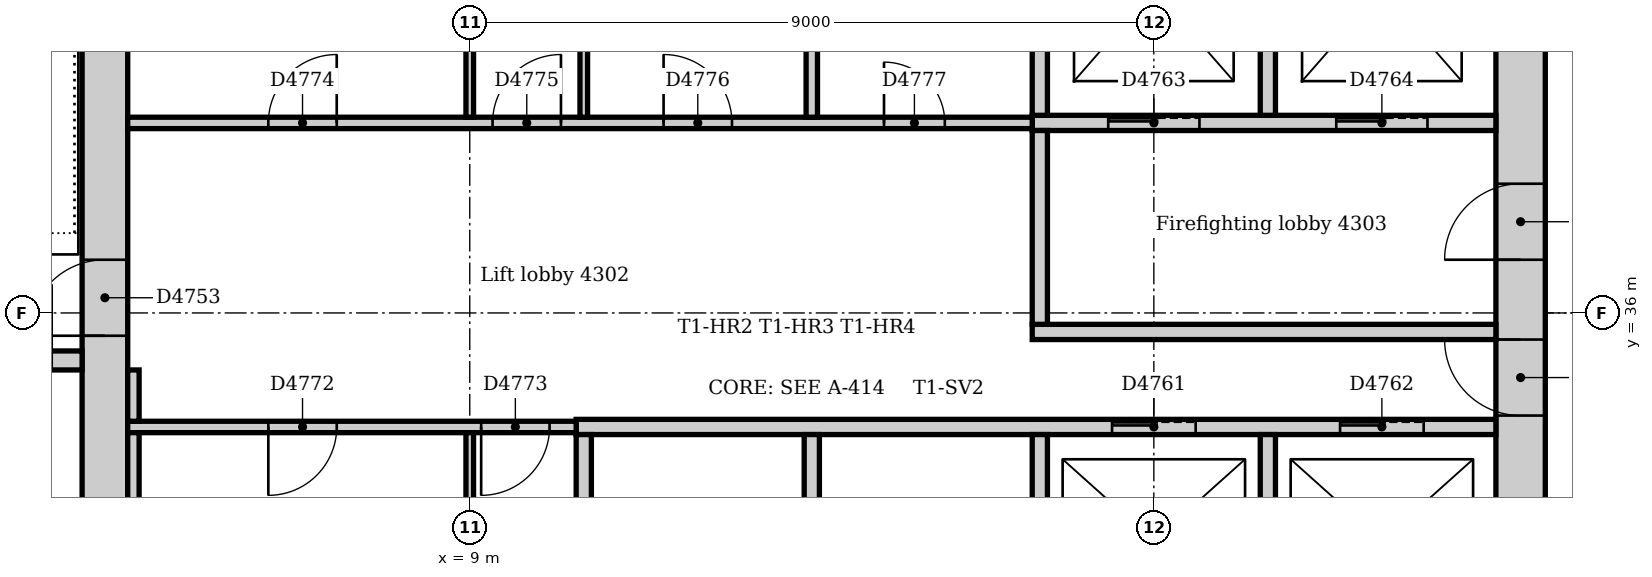
"""IFC4 building model, lengths in metres.
Left out: names, types, materials, properties, quantities, classifications, styles, units other than length and angle.
Written with IfcOpenShell. Run it as: python <this file> out.ifc"""

import sys

from ifc_helpers import new_model, si_unit, direction, frame, frame_2d, origin, place, context, subcontext, project, spatial, rectangle, extrude, element, fill, save


model = new_model("IFC4")
c1 = context("Model", 3, precision=1e-05, world=origin(), true_north=direction((0.0, 1.0)))
c2 = subcontext(c1, "Body", "Model", "MODEL_VIEW")
j1 = project(units=[si_unit("LENGTHUNIT", "METRE"), si_unit("PLANEANGLEUNIT", "RADIAN")], contexts=[c1])
p1 = place(None, origin())
s1 = spatial("IfcSite", under=j1, at=p1, CompositionType="ELEMENT")
p2 = place(p1, origin())
s2 = spatial("IfcBuilding", under=s1, at=p2, CompositionType="ELEMENT")
p3 = place(p2, frame((0.0, 0.0, 181.0)))
s3 = spatial("IfcBuildingStorey", under=s2, at=p3, CompositionType="ELEMENT", Elevation=181.0)
p4 = place(p3, frame((22.825, 31.5, 0.0), z_axis=(0.0, 0.0, 1.0), x_axis=(0.0, 1.0, 0.0)))
e1 = element("IfcWall", 1, at=p4, inside=s3, PredefinedType="SOLIDWALL", context=c2, shape_type="SweptSolid", body=[
    extrude(rectangle(XDim=10.5, YDim=0.65, at=frame_2d((5.25, 0.0))), origin(), (0.0, 0.0, 1.0), 4.0),
])
p5 = place(p4, frame((3.15, 0.0, 0.0)))
e2 = element("IfcOpeningElement", 2, at=p5, cuts=e1, PredefinedType="OPENING", context=c2, shape_type="SweptSolid", body=[
    extrude(rectangle(XDim=1.0, YDim=2.1, at=frame_2d((0.5, 1.05))), frame((0.0, 0.335, 0.0), z_axis=(0.0, -1.0, 0.0), x_axis=(1.0, 0.0, 0.0)), (0.0, 0.0, 1.0), 0.67),
])
p6 = place(p4, frame((5.2, 0.0, 0.0)))
e3 = element("IfcOpeningElement", 3, at=p6, cuts=e1, PredefinedType="OPENING", context=c2, shape_type="SweptSolid", body=[
    extrude(rectangle(XDim=1.0, YDim=2.1, at=frame_2d((0.5, 1.05))), frame((0.0, 0.335, 0.0), z_axis=(0.0, -1.0, 0.0), x_axis=(1.0, 0.0, 0.0)), (0.0, 0.0, 1.0), 0.67),
])
p7 = place(p3, frame((4.2, 42.0, 0.0), z_axis=(0.0, 0.0, 1.0), x_axis=(0.0, -1.0, 0.0)))
e4 = element("IfcWall", 4, at=p7, inside=s3, PredefinedType="SOLIDWALL", context=c2, shape_type="SweptSolid", body=[
    extrude(rectangle(XDim=10.5, YDim=0.6, at=frame_2d((5.25, 0.0))), origin(), (0.0, 0.0, 1.0), 4.0),
])
p8 = place(p7, frame((5.3, 0.0, 0.0)))
e5 = element("IfcOpeningElement", 5, at=p8, cuts=e4, PredefinedType="OPENING", context=c2, shape_type="SweptSolid", body=[
    extrude(rectangle(XDim=1.0, YDim=2.1, at=frame_2d((0.5, 1.05))), frame((0.0, 0.31, 0.0), z_axis=(0.0, -1.0, 0.0), x_axis=(1.0, 0.0, 0.0)), (0.0, 0.0, 1.0), 0.62),
])
p9 = place(p3, frame((0.36, 35.375, 0.0), z_axis=(0.0, 0.0, 1.0), x_axis=(1.0, 0.0, 0.0)))
e6 = element("IfcWall", 6, at=p9, inside=s3, PredefinedType="SOLIDWALL", context=c2, shape_type="SweptSolid", body=[
    extrude(rectangle(XDim=3.54, YDim=0.25, at=frame_2d((1.77, 0.0))), origin(), (0.0, 0.0, 1.0), 4.0),
])
p10 = place(p9, frame((2.14, 0.0, 0.0)))
e7 = element("IfcOpeningElement", 7, at=p10, cuts=e6, PredefinedType="OPENING", context=c2, shape_type="SweptSolid", body=[
    extrude(rectangle(XDim=1.0, YDim=2.1, at=frame_2d((0.5, 1.05))), frame((0.0, 0.135, 0.0), z_axis=(0.0, -1.0, 0.0), x_axis=(1.0, 0.0, 0.0)), (0.0, 0.0, 1.0), 0.27),
])
p11 = place(p3, frame((16.4, 35.75, 0.0), z_axis=(0.0, 0.0, 1.0), x_axis=(1.0, 0.0, 0.0)))
e8 = element("IfcWall", 8, at=p11, inside=s3, PredefinedType="PARTITIONING", context=c2, shape_type="SweptSolid", body=[
    extrude(rectangle(XDim=6.1, YDim=0.2, at=frame_2d((3.05, 0.0))), origin(), (0.0, 0.0, 1.0), 3.85),
])
p12 = place(p3, frame((16.4, 38.5, 0.0), z_axis=(0.0, 0.0, 1.0), x_axis=(1.0, 0.0, 0.0)))
e9 = element("IfcWall", 9, at=p12, inside=s3, PredefinedType="PARTITIONING", context=c2, shape_type="SweptSolid", body=[
    extrude(rectangle(XDim=6.1, YDim=0.2, at=frame_2d((3.05, 0.0))), origin(), (0.0, 0.0, 1.0), 3.85),
])
p13 = place(p12, frame((1.0, 0.0, 0.0)))
e10 = element("IfcOpeningElement", 10, at=p13, cuts=e9, PredefinedType="OPENING", context=c2, shape_type="SweptSolid", body=[
    extrude(rectangle(XDim=1.2, YDim=2.1, at=frame_2d((0.6, 1.05))), frame((0.0, 0.11, 0.0), z_axis=(0.0, -1.0, 0.0), x_axis=(1.0, 0.0, 0.0)), (0.0, 0.0, 1.0), 0.22),
])
p14 = place(p12, frame((4.0, 0.0, 0.0)))
e11 = element("IfcOpeningElement", 11, at=p14, cuts=e9, PredefinedType="OPENING", context=c2, shape_type="SweptSolid", body=[
    extrude(rectangle(XDim=1.2, YDim=2.1, at=frame_2d((0.6, 1.05))), frame((0.0, 0.11, 0.0), z_axis=(0.0, -1.0, 0.0), x_axis=(1.0, 0.0, 0.0)), (0.0, 0.0, 1.0), 0.22),
])
p15 = place(p3, frame((16.5, 35.85, 0.0), z_axis=(0.0, 0.0, 1.0), x_axis=(0.0, 1.0, 0.0)))
e12 = element("IfcWall", 12, at=p15, inside=s3, PredefinedType="PARTITIONING", context=c2, shape_type="SweptSolid", body=[
    extrude(rectangle(XDim=2.55, YDim=0.2, at=frame_2d((1.275, 0.0))), origin(), (0.0, 0.0, 1.0), 3.85),
])
p16 = place(p3, frame((10.4, 34.5, 0.0), z_axis=(0.0, 0.0, 1.0), x_axis=(1.0, 0.0, 0.0)))
e13 = element("IfcWall", 13, at=p16, inside=s3, PredefinedType="PARTITIONING", context=c2, shape_type="SweptSolid", body=[
    extrude(rectangle(XDim=12.1, YDim=0.2, at=frame_2d((6.05, 0.0))), origin(), (0.0, 0.0, 1.0), 3.85),
])
p17 = place(p16, frame((7.05, 0.0, 0.0)))
e14 = element("IfcOpeningElement", 14, at=p17, cuts=e13, PredefinedType="OPENING", context=c2, shape_type="SweptSolid", body=[
    extrude(rectangle(XDim=1.1, YDim=2.1, at=frame_2d((0.55, 1.05))), frame((0.0, 0.11, 0.0), z_axis=(0.0, -1.0, 0.0), x_axis=(1.0, 0.0, 0.0)), (0.0, 0.0, 1.0), 0.22),
])
p18 = place(p16, frame((10.05, 0.0, 0.0)))
e15 = element("IfcOpeningElement", 15, at=p18, cuts=e13, PredefinedType="OPENING", context=c2, shape_type="SweptSolid", body=[
    extrude(rectangle(XDim=1.1, YDim=2.1, at=frame_2d((0.55, 1.05))), frame((0.0, 0.11, 0.0), z_axis=(0.0, -1.0, 0.0), x_axis=(1.0, 0.0, 0.0)), (0.0, 0.0, 1.0), 0.22),
])
for number, where, z_axis, x_axis in (
    (16, (10.5, 31.75, 0.0), (0.0, 0.0, 1.0), (0.0, 1.0, 0.0)),
    (17, (13.5, 31.75, 0.0), (0.0, 0.0, 1.0), (0.0, 1.0, 0.0)),
    (18, (16.5, 31.75, 0.0), (0.0, 0.0, 1.0), (0.0, 1.0, 0.0)),
    (19, (19.5, 31.75, 0.0), (0.0, 0.0, 1.0), (0.0, 1.0, 0.0)),
):
    element("IfcWall", number, at=place(p3, frame(where, z_axis=z_axis, x_axis=x_axis)), inside=s3, PredefinedType="PARTITIONING", context=c2, shape_type="SweptSolid", body=[
        extrude(rectangle(XDim=2.65, YDim=0.2, at=frame_2d((1.325, 0.0))), origin(), (0.0, 0.0, 1.0), 3.85),
    ])
for number, where, z_axis, x_axis in (
    (20, (16.5, 38.6, 0.0), (0.0, 0.0, 1.0), (0.0, 1.0, 0.0)),
    (21, (19.5, 38.6, 0.0), (0.0, 0.0, 1.0), (0.0, 1.0, 0.0)),
):
    element("IfcWall", number, at=place(p3, frame(where, z_axis=z_axis, x_axis=x_axis)), inside=s3, PredefinedType="PARTITIONING", context=c2, shape_type="SweptSolid", body=[
        extrude(rectangle(XDim=3.4, YDim=0.2, at=frame_2d((1.7, 0.0))), origin(), (0.0, 0.0, 1.0), 3.85),
    ])
p19 = place(p3, frame((4.5, 38.5, 0.0), z_axis=(0.0, 0.0, 1.0), x_axis=(1.0, 0.0, 0.0)))
e22 = element("IfcWall", 22, at=p19, inside=s3, PredefinedType="PARTITIONING", context=c2, shape_type="SweptSolid", body=[
    extrude(rectangle(XDim=11.9, YDim=0.15, at=frame_2d((5.95, 0.0))), origin(), (0.0, 0.0, 1.0), 3.85),
])
p20 = place(p19, frame((1.85, 0.0, 0.0)))
e23 = element("IfcOpeningElement", 23, at=p20, cuts=e22, PredefinedType="OPENING", context=c2, shape_type="SweptSolid", body=[
    extrude(rectangle(XDim=0.9, YDim=2.1, at=frame_2d((0.45, 1.05))), frame((0.0, 0.085, 0.0), z_axis=(0.0, -1.0, 0.0), x_axis=(1.0, 0.0, 0.0)), (0.0, 0.0, 1.0), 0.17),
])
p21 = place(p19, frame((4.8, 0.0, 0.0)))
e24 = element("IfcOpeningElement", 24, at=p21, cuts=e22, PredefinedType="OPENING", context=c2, shape_type="SweptSolid", body=[
    extrude(rectangle(XDim=0.9, YDim=2.1, at=frame_2d((0.45, 1.05))), frame((0.0, 0.085, 0.0), z_axis=(0.0, -1.0, 0.0), x_axis=(1.0, 0.0, 0.0)), (0.0, 0.0, 1.0), 0.17),
])
p22 = place(p19, frame((7.05, 0.0, 0.0)))
e25 = element("IfcOpeningElement", 25, at=p22, cuts=e22, PredefinedType="OPENING", context=c2, shape_type="SweptSolid", body=[
    extrude(rectangle(XDim=0.9, YDim=2.1, at=frame_2d((0.45, 1.05))), frame((0.0, 0.085, 0.0), z_axis=(0.0, -1.0, 0.0), x_axis=(1.0, 0.0, 0.0)), (0.0, 0.0, 1.0), 0.17),
])
p23 = place(p19, frame((9.95, 0.0, 0.0)))
e26 = element("IfcOpeningElement", 26, at=p23, cuts=e22, PredefinedType="OPENING", context=c2, shape_type="SweptSolid", body=[
    extrude(rectangle(XDim=0.8, YDim=2.1, at=frame_2d((0.4, 1.05))), frame((0.0, 0.085, 0.0), z_axis=(0.0, -1.0, 0.0), x_axis=(1.0, 0.0, 0.0)), (0.0, 0.0, 1.0), 0.17),
])
p24 = place(p3, frame((4.5, 34.5, 0.0), z_axis=(0.0, 0.0, 1.0), x_axis=(1.0, 0.0, 0.0)))
e27 = element("IfcWall", 27, at=p24, inside=s3, PredefinedType="PARTITIONING", context=c2, shape_type="SweptSolid", body=[
    extrude(rectangle(XDim=5.9, YDim=0.15, at=frame_2d((2.95, 0.0))), origin(), (0.0, 0.0, 1.0), 3.85),
])
p25 = place(p24, frame((1.85, 0.0, 0.0)))
e28 = element("IfcOpeningElement", 28, at=p25, cuts=e27, PredefinedType="OPENING", context=c2, shape_type="SweptSolid", body=[
    extrude(rectangle(XDim=0.9, YDim=2.1, at=frame_2d((0.45, 1.05))), frame((0.0, 0.085, 0.0), z_axis=(0.0, -1.0, 0.0), x_axis=(1.0, 0.0, 0.0)), (0.0, 0.0, 1.0), 0.17),
])
p26 = place(p24, frame((4.65, 0.0, 0.0)))
e29 = element("IfcOpeningElement", 29, at=p26, cuts=e27, PredefinedType="OPENING", context=c2, shape_type="SweptSolid", body=[
    extrude(rectangle(XDim=0.9, YDim=2.1, at=frame_2d((0.45, 1.05))), frame((0.0, 0.085, 0.0), z_axis=(0.0, -1.0, 0.0), x_axis=(1.0, 0.0, 0.0)), (0.0, 0.0, 1.0), 0.17),
])
p27 = place(p3, frame((4.575, 34.575, 0.0), z_axis=(0.0, 0.0, 1.0), x_axis=(0.0, 1.0, 0.0)))
e30 = element("IfcWall", 30, at=p27, inside=s3, PredefinedType="PARTITIONING", context=c2, shape_type="SweptSolid", body=[
    extrude(rectangle(XDim=0.675, YDim=0.15, at=frame_2d((0.338, 0.0))), origin(), (0.0, 0.0, 1.0), 3.85),
])
p28 = place(p3, frame((4.575, 31.75, 0.0), z_axis=(0.0, 0.0, 1.0), x_axis=(0.0, 1.0, 0.0)))
e31 = element("IfcWall", 31, at=p28, inside=s3, PredefinedType="PARTITIONING", context=c2, shape_type="SweptSolid", body=[
    extrude(rectangle(XDim=2.675, YDim=0.15, at=frame_2d((1.337, 0.0))), origin(), (0.0, 0.0, 1.0), 3.85),
])
p29 = place(p3, frame((13.5, 38.575, 0.0), z_axis=(0.0, 0.0, 1.0), x_axis=(0.0, 1.0, 0.0)))
e32 = element("IfcWall", 32, at=p29, inside=s3, PredefinedType="PARTITIONING", context=c2, shape_type="SweptSolid", body=[
    extrude(rectangle(XDim=3.425, YDim=0.15, at=frame_2d((1.712, 0.0))), origin(), (0.0, 0.0, 1.0), 3.85),
])
for number, where, z_axis, x_axis in (
    (33, (9.0, 38.575, 0.0), (0.0, 0.0, 1.0), (0.0, 1.0, 0.0)),
    (34, (10.5, 38.575, 0.0), (0.0, 0.0, 1.0), (0.0, 1.0, 0.0)),
):
    element("IfcWall", number, at=place(p3, frame(where, z_axis=z_axis, x_axis=x_axis)), inside=s3, PredefinedType="PARTITIONING", context=c2, shape_type="SweptSolid", body=[
        extrude(rectangle(XDim=3.425, YDim=0.1, at=frame_2d((1.712, 0.0))), origin(), (0.0, 0.0, 1.0), 3.85),
    ])
p30 = place(p3, frame((9.0, 31.75, 0.0), z_axis=(0.0, 0.0, 1.0), x_axis=(0.0, 1.0, 0.0)))
e35 = element("IfcWall", 35, at=p30, inside=s3, PredefinedType="PARTITIONING", context=c2, shape_type="SweptSolid", body=[
    extrude(rectangle(XDim=2.675, YDim=0.1, at=frame_2d((1.337, 0.0))), origin(), (0.0, 0.0, 1.0), 3.85),
])
p31 = place(p8, frame((1.0, 0.0, 0.0), z_axis=(0.0, 0.0, 1.0), x_axis=(-1.0, 0.0, 0.0)))
e36 = element("IfcDoor", 36, at=p31, inside=s3, OperationType="SINGLE_SWING_LEFT", PredefinedType="DOOR", context=c2, shape_type="SweptSolid", body=[
    extrude(rectangle(XDim=1.0, YDim=2.1, at=frame_2d((0.5, 1.05))), frame((0.0, 0.025, 0.0), z_axis=(0.0, -1.0, 0.0), x_axis=(1.0, 0.0, 0.0)), (0.0, 0.0, 1.0), 0.05),
])
fill(e5, e36)
p32 = place(p17, origin())
e37 = element("IfcDoor", 37, at=p32, inside=s3, OperationType="SLIDING_TO_LEFT", PredefinedType="DOOR", context=c2, shape_type="SweptSolid", body=[
    extrude(rectangle(XDim=1.1, YDim=2.1, at=frame_2d((0.55, 1.05))), frame((0.0, 0.025, 0.0), z_axis=(0.0, -1.0, 0.0), x_axis=(1.0, 0.0, 0.0)), (0.0, 0.0, 1.0), 0.05),
])
fill(e14, e37)
p33 = place(p18, origin())
e38 = element("IfcDoor", 38, at=p33, inside=s3, OperationType="SLIDING_TO_LEFT", PredefinedType="DOOR", context=c2, shape_type="SweptSolid", body=[
    extrude(rectangle(XDim=1.1, YDim=2.1, at=frame_2d((0.55, 1.05))), frame((0.0, 0.025, 0.0), z_axis=(0.0, -1.0, 0.0), x_axis=(1.0, 0.0, 0.0)), (0.0, 0.0, 1.0), 0.05),
])
fill(e15, e38)
p34 = place(p13, origin())
e39 = element("IfcDoor", 39, at=p34, inside=s3, OperationType="SLIDING_TO_LEFT", PredefinedType="DOOR", context=c2, shape_type="SweptSolid", body=[
    extrude(rectangle(XDim=1.2, YDim=2.1, at=frame_2d((0.6, 1.05))), frame((0.0, 0.025, 0.0), z_axis=(0.0, -1.0, 0.0), x_axis=(1.0, 0.0, 0.0)), (0.0, 0.0, 1.0), 0.05),
])
fill(e10, e39)
p35 = place(p14, origin())
e40 = element("IfcDoor", 40, at=p35, inside=s3, OperationType="SLIDING_TO_LEFT", PredefinedType="DOOR", context=c2, shape_type="SweptSolid", body=[
    extrude(rectangle(XDim=1.2, YDim=2.1, at=frame_2d((0.6, 1.05))), frame((0.0, 0.025, 0.0), z_axis=(0.0, -1.0, 0.0), x_axis=(1.0, 0.0, 0.0)), (0.0, 0.0, 1.0), 0.05),
])
fill(e11, e40)
p36 = place(p5, origin())
e41 = element("IfcDoor", 41, at=p36, inside=s3, OperationType="SINGLE_SWING_RIGHT", PredefinedType="DOOR", context=c2, shape_type="SweptSolid", body=[
    extrude(rectangle(XDim=1.0, YDim=2.1, at=frame_2d((0.5, 1.05))), frame((0.0, 0.025, 0.0), z_axis=(0.0, -1.0, 0.0), x_axis=(1.0, 0.0, 0.0)), (0.0, 0.0, 1.0), 0.05),
])
fill(e2, e41)
p37 = place(p6, origin())
e42 = element("IfcDoor", 42, at=p37, inside=s3, OperationType="SINGLE_SWING_LEFT", PredefinedType="DOOR", context=c2, shape_type="SweptSolid", body=[
    extrude(rectangle(XDim=1.0, YDim=2.1, at=frame_2d((0.5, 1.05))), frame((0.0, 0.025, 0.0), z_axis=(0.0, -1.0, 0.0), x_axis=(1.0, 0.0, 0.0)), (0.0, 0.0, 1.0), 0.05),
])
fill(e3, e42)
p38 = place(p25, frame((0.9, 0.0, 0.0), z_axis=(0.0, 0.0, 1.0), x_axis=(-1.0, 0.0, 0.0)))
e43 = element("IfcDoor", 43, at=p38, inside=s3, OperationType="SINGLE_SWING_RIGHT", PredefinedType="DOOR", context=c2, shape_type="SweptSolid", body=[
    extrude(rectangle(XDim=0.9, YDim=2.1, at=frame_2d((0.45, 1.05))), frame((0.0, 0.025, 0.0), z_axis=(0.0, -1.0, 0.0), x_axis=(1.0, 0.0, 0.0)), (0.0, 0.0, 1.0), 0.05),
])
fill(e28, e43)
p39 = place(p26, frame((0.9, 0.0, 0.0), z_axis=(0.0, 0.0, 1.0), x_axis=(-1.0, 0.0, 0.0)))
e44 = element("IfcDoor", 44, at=p39, inside=s3, OperationType="SINGLE_SWING_RIGHT", PredefinedType="DOOR", context=c2, shape_type="SweptSolid", body=[
    extrude(rectangle(XDim=0.9, YDim=2.1, at=frame_2d((0.45, 1.05))), frame((0.0, 0.025, 0.0), z_axis=(0.0, -1.0, 0.0), x_axis=(1.0, 0.0, 0.0)), (0.0, 0.0, 1.0), 0.05),
])
fill(e29, e44)
p40 = place(p20, origin())
e45 = element("IfcDoor", 45, at=p40, inside=s3, OperationType="SINGLE_SWING_RIGHT", PredefinedType="DOOR", context=c2, shape_type="SweptSolid", body=[
    extrude(rectangle(XDim=0.9, YDim=2.1, at=frame_2d((0.45, 1.05))), frame((0.0, 0.025, 0.0), z_axis=(0.0, -1.0, 0.0), x_axis=(1.0, 0.0, 0.0)), (0.0, 0.0, 1.0), 0.05),
])
fill(e23, e45)
p41 = place(p21, origin())
e46 = element("IfcDoor", 46, at=p41, inside=s3, OperationType="SINGLE_SWING_RIGHT", PredefinedType="DOOR", context=c2, shape_type="SweptSolid", body=[
    extrude(rectangle(XDim=0.9, YDim=2.1, at=frame_2d((0.45, 1.05))), frame((0.0, 0.025, 0.0), z_axis=(0.0, -1.0, 0.0), x_axis=(1.0, 0.0, 0.0)), (0.0, 0.0, 1.0), 0.05),
])
fill(e24, e46)
p42 = place(p22, origin())
e47 = element("IfcDoor", 47, at=p42, inside=s3, OperationType="SINGLE_SWING_LEFT", PredefinedType="DOOR", context=c2, shape_type="SweptSolid", body=[
    extrude(rectangle(XDim=0.9, YDim=2.1, at=frame_2d((0.45, 1.05))), frame((0.0, 0.025, 0.0), z_axis=(0.0, -1.0, 0.0), x_axis=(1.0, 0.0, 0.0)), (0.0, 0.0, 1.0), 0.05),
])
fill(e25, e47)
p43 = place(p23, origin())
e48 = element("IfcDoor", 48, at=p43, inside=s3, OperationType="SINGLE_SWING_LEFT", PredefinedType="DOOR", context=c2, shape_type="SweptSolid", body=[
    extrude(rectangle(XDim=0.8, YDim=2.1, at=frame_2d((0.4, 1.05))), frame((0.0, 0.025, 0.0), z_axis=(0.0, -1.0, 0.0), x_axis=(1.0, 0.0, 0.0)), (0.0, 0.0, 1.0), 0.05),
])
fill(e26, e48)
save(model, sys.argv[1])
